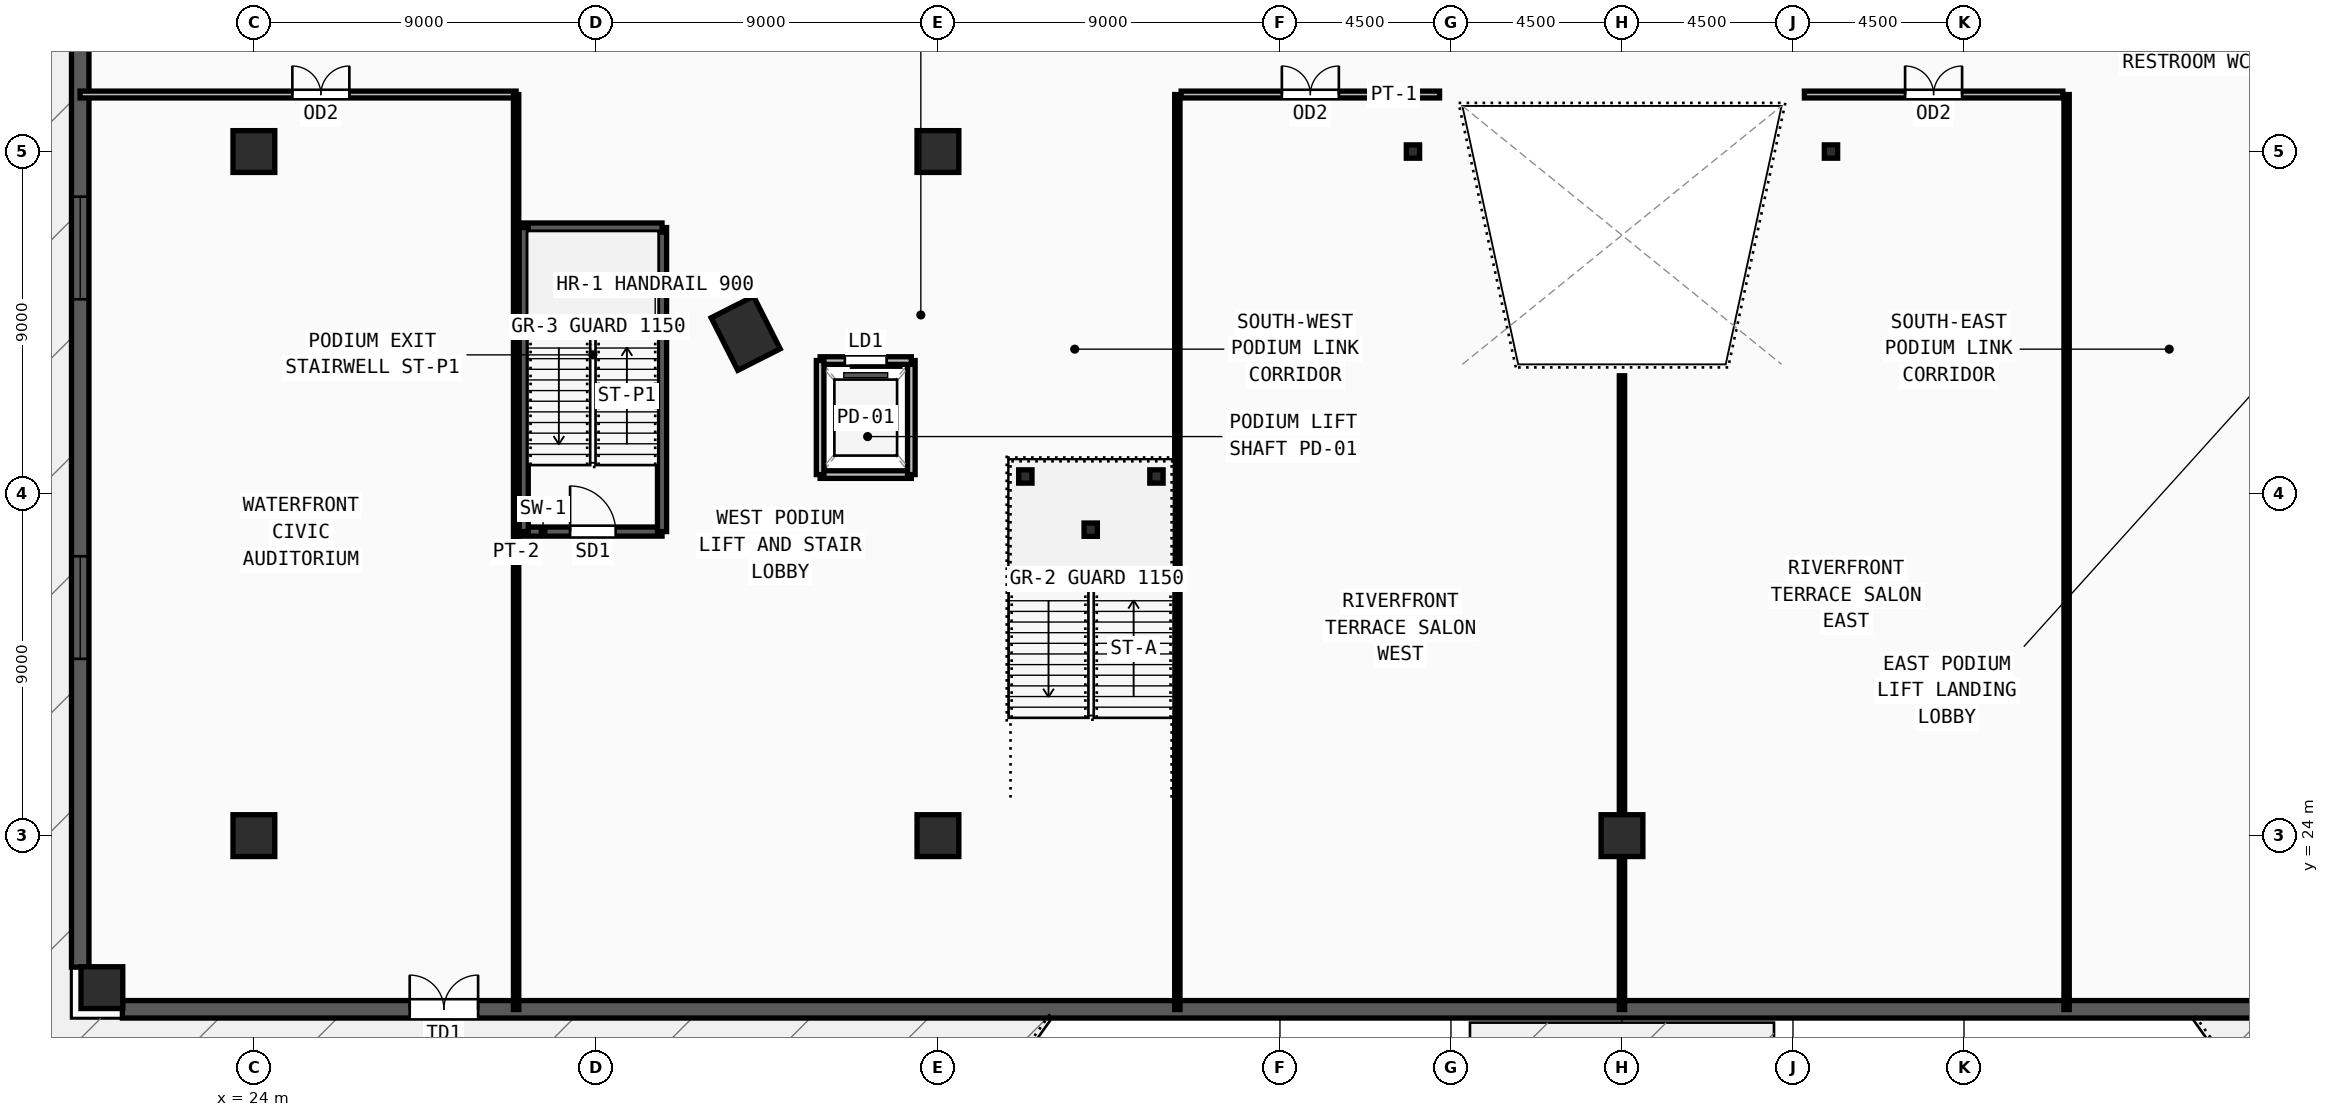
"""IFC4 building model, lengths in metres.
Left out: names, types, materials, properties, quantities, classifications, styles, units other than length and angle.
Written with IfcOpenShell. Run it as: python <this file> out.ifc"""

import sys

from ifc_helpers import new_model, si_unit, direction, frame, frame_2d, origin, origin_2d, place, context, subcontext, project, spatial, rectangle, i_section, extrude, source, transform, mapped, element, fill, save


model = new_model("IFC4")
c1 = context("Model", 3, precision=1e-05, world=origin(), true_north=direction((0.0, 1.0)))
c2 = subcontext(c1, "Body", "Model", "MODEL_VIEW")
j1 = project(units=[si_unit("LENGTHUNIT", "METRE"), si_unit("PLANEANGLEUNIT", "RADIAN")], contexts=[c1])
p1 = place(None, origin())
s1 = spatial("IfcSite", under=j1, at=p1, CompositionType="ELEMENT")
p2 = place(p1, origin())
s2 = spatial("IfcBuilding", under=s1, at=p2, CompositionType="ELEMENT")
p3 = place(p2, frame((0.0, 0.0, 9.9)))
s3 = spatial("IfcBuildingStorey", under=s2, at=p3, CompositionType="ELEMENT", Elevation=9.9)
m1 = source(origin(), c2, "Body", "SweptSolid", [
    extrude(rectangle(XDim=1.55, YDim=1.25, at=origin_2d()), origin(), (0.0, 0.0, 1.0), 4.5),
])
p4 = place(p3, frame((36.941, 37.217, 0.0), z_axis=(0.0, 0.0, 1.0), x_axis=(-0.451500573218, 0.892270829056, 0.0)))
e1 = element("IfcColumn", 1, at=p4, inside=s3, PredefinedType="COLUMN", context=c2, shape_type="MappedRepresentation", body=[
    mapped(m1, transform((0.0, 0.0, 0.0), x_axis=(1.0, 0.0, 0.0), y_axis=(0.0, 1.0, 0.0), z_axis=(0.0, 0.0, 1.0), scale=1.0)),
])
m2 = source(origin(), c2, "Body", "SweptSolid", [
    extrude(rectangle(XDim=1.1, YDim=1.1, at=origin_2d()), origin(), (0.0, 0.0, 1.0), 4.5),
])
for number, where, z_axis, x_axis in (
    (2, (24.0, 24.0, 0.0), (0.0, 0.0, 1.0), (1.0, 0.0, 0.0)),
    (3, (42.0, 24.0, 0.0), (0.0, 0.0, 1.0), (1.0, 0.0, 0.0)),
    (4, (60.0, 24.0, 0.0), (0.0, 0.0, 1.0), (1.0, 0.0, 0.0)),
    (5, (24.0, 42.0, 0.0), (0.0, 0.0, 1.0), (1.0, 0.0, 0.0)),
    (6, (42.0, 42.0, 0.0), (0.0, 0.0, 1.0), (1.0, 0.0, 0.0)),
    (7, (20.0, 20.0, 0.0), (0.0, 0.0, 1.0), (1.0, 0.0, 0.0)),
):
    element("IfcColumn", number, at=place(p3, frame(where, z_axis=z_axis, x_axis=x_axis)), inside=s3, PredefinedType="COLUMN", context=c2, shape_type="MappedRepresentation", body=[
        mapped(m2, transform((0.0, 0.0, 0.0), x_axis=(1.0, 0.0, 0.0), y_axis=(0.0, 1.0, 0.0), z_axis=(0.0, 0.0, 1.0), scale=1.0)),
    ])
m3 = source(origin(), c2, "Body", "SweptSolid", [
    extrude(i_section(OverallWidth=0.35, OverallDepth=0.35, WebThickness=0.012, FlangeThickness=0.019, at=origin_2d()), origin(), (0.0, 0.0, 1.0), 4.5),
])
for number, where, z_axis, x_axis in (
    (8, (54.5, 42.0, 0.0), (0.0, 0.0, 1.0), (1.0, 0.0, 0.0)),
    (9, (65.5, 42.0, 0.0), (0.0, 0.0, 1.0), (1.0, 0.0, 0.0)),
    (10, (44.3, 33.45, 0.0), (0.0, 0.0, 1.0), (1.0, 0.0, 0.0)),
    (11, (47.75, 33.45, 0.0), (0.0, 0.0, 1.0), (1.0, 0.0, 0.0)),
    (12, (46.02, 32.05, 0.0), (0.0, 0.0, 1.0), (1.0, 0.0, 0.0)),
):
    element("IfcColumn", number, at=place(p3, frame(where, z_axis=z_axis, x_axis=x_axis)), inside=s3, PredefinedType="COLUMN", context=c2, shape_type="MappedRepresentation", body=[
        mapped(m3, transform((0.0, 0.0, 0.0), x_axis=(1.0, 0.0, 0.0), y_axis=(0.0, 1.0, 0.0), z_axis=(0.0, 0.0, 1.0), scale=1.0)),
    ])
p5 = place(p3, frame((19.43, 86.77, 0.0), z_axis=(0.0, 0.0, 1.0), x_axis=(0.0, -1.0, 0.0)))
e13 = element("IfcWall", 13, at=p5, inside=s3, PredefinedType="SOLIDWALL", context=c2, shape_type="SweptSolid", body=[
    extrude(rectangle(XDim=66.23, YDim=0.46, at=frame_2d((33.115, 0.0))), origin(), (0.0, 0.0, 1.0), 4.25),
])
m4 = source(origin(), c2, "Body", "SweptSolid", [
    extrude(rectangle(XDim=2.7, YDim=2.35, at=frame_2d((1.35, 1.175))), frame((0.0, 0.24, 0.0), z_axis=(0.0, -1.0, 0.0), x_axis=(1.0, 0.0, 0.0)), (0.0, 0.0, 1.0), 0.48),
])
p6 = place(p5, frame((8.111, 0.0, 0.55)))
e14 = element("IfcOpeningElement", 14, at=p6, cuts=e13, PredefinedType="OPENING", context=c2, shape_type="MappedRepresentation", body=[
    mapped(m4, transform((0.0, 0.0, 0.0), x_axis=(1.0, 0.0, 0.0), y_axis=(0.0, 1.0, 0.0), z_axis=(0.0, 0.0, 1.0), scale=1.0)),
])
p7 = place(p5, frame((27.034, 0.0, 0.55)))
e15 = element("IfcOpeningElement", 15, at=p7, cuts=e13, PredefinedType="OPENING", context=c2, shape_type="MappedRepresentation", body=[
    mapped(m4, transform((0.0, 0.0, 0.0), x_axis=(1.0, 0.0, 0.0), y_axis=(0.0, 1.0, 0.0), z_axis=(0.0, 0.0, 1.0), scale=1.0)),
])
p8 = place(p5, frame((36.496, 0.0, 0.55)))
e16 = element("IfcOpeningElement", 16, at=p8, cuts=e13, PredefinedType="OPENING", context=c2, shape_type="MappedRepresentation", body=[
    mapped(m4, transform((0.0, 0.0, 0.0), x_axis=(1.0, 0.0, 0.0), y_axis=(0.0, 1.0, 0.0), z_axis=(0.0, 0.0, 1.0), scale=1.0)),
])
p9 = place(p5, frame((45.957, 0.0, 0.55)))
e17 = element("IfcOpeningElement", 17, at=p9, cuts=e13, PredefinedType="OPENING", context=c2, shape_type="MappedRepresentation", body=[
    mapped(m4, transform((0.0, 0.0, 0.0), x_axis=(1.0, 0.0, 0.0), y_axis=(0.0, 1.0, 0.0), z_axis=(0.0, 0.0, 1.0), scale=1.0)),
])
p10 = place(p5, frame((55.419, 0.0, 0.55)))
e18 = element("IfcOpeningElement", 18, at=p10, cuts=e13, PredefinedType="OPENING", context=c2, shape_type="MappedRepresentation", body=[
    mapped(m4, transform((0.0, 0.0, 0.0), x_axis=(1.0, 0.0, 0.0), y_axis=(0.0, 1.0, 0.0), z_axis=(0.0, 0.0, 1.0), scale=1.0)),
])
p11 = place(p3, frame((20.54, 19.43, 0.0), z_axis=(0.0, 0.0, 1.0), x_axis=(1.0, 0.0, 0.0)))
e19 = element("IfcWall", 19, at=p11, inside=s3, PredefinedType="SOLIDWALL", context=c2, shape_type="SweptSolid", body=[
    extrude(rectangle(XDim=78.92, YDim=0.46, at=frame_2d((39.46, 0.0))), origin(), (0.0, 0.0, 1.0), 4.25),
])
m5 = source(origin(), c2, "Body", "SweptSolid", [
    extrude(rectangle(XDim=1.8, YDim=2.3, at=frame_2d((0.9, 1.15))), frame((0.0, 0.24, 0.0), z_axis=(0.0, -1.0, 0.0), x_axis=(1.0, 0.0, 0.0)), (0.0, 0.0, 1.0), 0.48),
])
p12 = place(p11, frame((7.56, 0.0, 0.0)))
e20 = element("IfcOpeningElement", 20, at=p12, cuts=e19, PredefinedType="OPENING", context=c2, shape_type="MappedRepresentation", body=[
    mapped(m5, transform((0.0, 0.0, 0.0), x_axis=(1.0, 0.0, 0.0), y_axis=(0.0, 1.0, 0.0), z_axis=(0.0, 0.0, 1.0), scale=1.0)),
])
p13 = place(p11, frame((69.56, 0.0, 0.0)))
e21 = element("IfcOpeningElement", 21, at=p13, cuts=e19, PredefinedType="OPENING", context=c2, shape_type="MappedRepresentation", body=[
    mapped(m5, transform((0.0, 0.0, 0.0), x_axis=(1.0, 0.0, 0.0), y_axis=(0.0, 1.0, 0.0), z_axis=(0.0, 0.0, 1.0), scale=1.0)),
])
p14 = place(p3, frame((31.1, 32.0, 0.0), z_axis=(0.0, 0.0, 1.0), x_axis=(1.0, 0.0, 0.0)))
e22 = element("IfcWall", 22, at=p14, inside=s3, PredefinedType="SOLIDWALL", context=c2, shape_type="SweptSolid", body=[
    extrude(rectangle(XDim=3.64, YDim=0.24, at=frame_2d((1.82, 0.0))), origin(), (0.0, 0.0, 1.0), 4.25),
])
m6 = source(origin(), c2, "Body", "SweptSolid", [
    extrude(rectangle(XDim=1.2, YDim=2.2, at=frame_2d((0.6, 1.1))), frame((0.0, 0.13, 0.0), z_axis=(0.0, -1.0, 0.0), x_axis=(1.0, 0.0, 0.0)), (0.0, 0.0, 1.0), 0.26),
])
p15 = place(p14, frame((1.22, 0.0, 0.0)))
e23 = element("IfcOpeningElement", 23, at=p15, cuts=e22, PredefinedType="OPENING", context=c2, shape_type="MappedRepresentation", body=[
    mapped(m6, transform((0.0, 0.0, 0.0), x_axis=(1.0, 0.0, 0.0), y_axis=(0.0, 1.0, 0.0), z_axis=(0.0, 0.0, 1.0), scale=1.0)),
])
p16 = place(p3, frame((34.74, 32.0, 0.0), z_axis=(0.0, 0.0, 1.0), x_axis=(0.0, 1.0, 0.0)))
e24 = element("IfcWall", 24, at=p16, inside=s3, PredefinedType="SOLIDWALL", context=c2, shape_type="SweptSolid", body=[
    extrude(rectangle(XDim=8.0, YDim=0.24, at=frame_2d((4.0, 0.0))), origin(), (0.0, 0.0, 1.0), 4.25),
])
p17 = place(p3, frame((34.74, 40.0, 0.0), z_axis=(0.0, 0.0, 1.0), x_axis=(-1.0, 0.0, 0.0)))
e25 = element("IfcWall", 25, at=p17, inside=s3, PredefinedType="SOLIDWALL", context=c2, shape_type="SweptSolid", body=[
    extrude(rectangle(XDim=3.64, YDim=0.24, at=frame_2d((1.82, 0.0))), origin(), (0.0, 0.0, 1.0), 4.25),
])
p18 = place(p3, frame((31.1, 40.0, 0.0), z_axis=(0.0, 0.0, 1.0), x_axis=(0.0, -1.0, 0.0)))
e26 = element("IfcWall", 26, at=p18, inside=s3, PredefinedType="SOLIDWALL", context=c2, shape_type="SweptSolid", body=[
    extrude(rectangle(XDim=8.0, YDim=0.24, at=frame_2d((4.0, 0.0))), origin(), (0.0, 0.0, 1.0), 4.25),
])
p19 = place(p3, frame((38.9, 33.5, 0.0), z_axis=(0.0, 0.0, 1.0), x_axis=(1.0, 0.0, 0.0)))
e27 = element("IfcWall", 27, at=p19, inside=s3, PredefinedType="SOLIDWALL", context=c2, shape_type="SweptSolid", body=[
    extrude(rectangle(XDim=2.4, YDim=0.2, at=frame_2d((1.2, 0.0))), origin(), (0.0, 0.0, 1.0), 4.25),
])
p20 = place(p3, frame((41.3, 33.5, 0.0), z_axis=(0.0, 0.0, 1.0), x_axis=(0.0, 1.0, 0.0)))
e28 = element("IfcWall", 28, at=p20, inside=s3, PredefinedType="SOLIDWALL", context=c2, shape_type="SweptSolid", body=[
    extrude(rectangle(XDim=3.0, YDim=0.2, at=frame_2d((1.5, 0.0))), origin(), (0.0, 0.0, 1.0), 4.25),
])
p21 = place(p3, frame((41.3, 36.5, 0.0), z_axis=(0.0, 0.0, 1.0), x_axis=(-1.0, 0.0, 0.0)))
e29 = element("IfcWall", 29, at=p21, inside=s3, PredefinedType="SOLIDWALL", context=c2, shape_type="SweptSolid", body=[
    extrude(rectangle(XDim=2.4, YDim=0.2, at=frame_2d((1.2, 0.0))), origin(), (0.0, 0.0, 1.0), 4.25),
])
m7 = source(origin(), c2, "Body", "SweptSolid", [
    extrude(rectangle(XDim=1.1, YDim=2.2, at=frame_2d((0.55, 1.1))), frame((0.0, 0.11, 0.0), z_axis=(0.0, -1.0, 0.0), x_axis=(1.0, 0.0, 0.0)), (0.0, 0.0, 1.0), 0.22),
])
p22 = place(p21, frame((0.65, 0.0, 0.0)))
e30 = element("IfcOpeningElement", 30, at=p22, cuts=e29, PredefinedType="OPENING", context=c2, shape_type="MappedRepresentation", body=[
    mapped(m7, transform((0.0, 0.0, 0.0), x_axis=(1.0, 0.0, 0.0), y_axis=(0.0, 1.0, 0.0), z_axis=(0.0, 0.0, 1.0), scale=1.0)),
])
p23 = place(p3, frame((38.9, 36.5, 0.0), z_axis=(0.0, 0.0, 1.0), x_axis=(0.0, -1.0, 0.0)))
e31 = element("IfcWall", 31, at=p23, inside=s3, PredefinedType="SOLIDWALL", context=c2, shape_type="SweptSolid", body=[
    extrude(rectangle(XDim=3.0, YDim=0.2, at=frame_2d((1.5, 0.0))), origin(), (0.0, 0.0, 1.0), 4.25),
])
p24 = place(p3, frame((48.4, 43.5, 0.0), z_axis=(0.0, 0.0, 1.0), x_axis=(1.0, 0.0, 0.0)))
e32 = element("IfcWall", 32, at=p24, inside=s3, PredefinedType="PARTITIONING", context=c2, shape_type="SweptSolid", body=[
    extrude(rectangle(XDim=6.8, YDim=0.18, at=frame_2d((3.4, 0.0))), origin(), (0.0, 0.0, 1.0), 4.25),
])
m8 = source(origin(), c2, "Body", "SweptSolid", [
    extrude(rectangle(XDim=1.5, YDim=2.2, at=frame_2d((0.75, 1.1))), frame((0.0, 0.1, 0.0), z_axis=(0.0, -1.0, 0.0), x_axis=(1.0, 0.0, 0.0)), (0.0, 0.0, 1.0), 0.2),
])
p25 = place(p24, frame((2.65, 0.0, 0.0)))
e33 = element("IfcOpeningElement", 33, at=p25, cuts=e32, PredefinedType="OPENING", context=c2, shape_type="MappedRepresentation", body=[
    mapped(m8, transform((0.0, 0.0, 0.0), x_axis=(1.0, 0.0, 0.0), y_axis=(0.0, 1.0, 0.0), z_axis=(0.0, 0.0, 1.0), scale=1.0)),
])
p26 = place(p3, frame((64.8, 43.5, 0.0), z_axis=(0.0, 0.0, 1.0), x_axis=(1.0, 0.0, 0.0)))
e34 = element("IfcWall", 34, at=p26, inside=s3, PredefinedType="PARTITIONING", context=c2, shape_type="SweptSolid", body=[
    extrude(rectangle(XDim=6.8, YDim=0.18, at=frame_2d((3.4, 0.0))), origin(), (0.0, 0.0, 1.0), 4.25),
])
p27 = place(p26, frame((2.65, 0.0, 0.0)))
e35 = element("IfcOpeningElement", 35, at=p27, cuts=e34, PredefinedType="OPENING", context=c2, shape_type="MappedRepresentation", body=[
    mapped(m8, transform((0.0, 0.0, 0.0), x_axis=(1.0, 0.0, 0.0), y_axis=(0.0, 1.0, 0.0), z_axis=(0.0, 0.0, 1.0), scale=1.0)),
])
p28 = place(p3, frame((19.425, 43.5, 0.0), z_axis=(0.0, 0.0, 1.0), x_axis=(1.0, 0.0, 0.0)))
e36 = element("IfcWall", 36, at=p28, inside=s3, PredefinedType="PARTITIONING", context=c2, shape_type="SweptSolid", body=[
    extrude(rectangle(XDim=11.475, YDim=0.18, at=frame_2d((5.737, 0.0))), origin(), (0.0, 0.0, 1.0), 4.25),
])
p29 = place(p28, frame((5.587, 0.0, 0.0)))
e37 = element("IfcOpeningElement", 37, at=p29, cuts=e36, PredefinedType="OPENING", context=c2, shape_type="MappedRepresentation", body=[
    mapped(m8, transform((0.0, 0.0, 0.0), x_axis=(1.0, 0.0, 0.0), y_axis=(0.0, 1.0, 0.0), z_axis=(0.0, 0.0, 1.0), scale=1.0)),
])
for number, where, z_axis, x_axis in (
    (38, (30.9, 19.425, 0.0), (0.0, 0.0, 1.0), (0.0, 1.0, 0.0)),
    (39, (48.3, 19.425, 0.0), (0.0, 0.0, 1.0), (0.0, 1.0, 0.0)),
    (40, (71.7, 19.425, 0.0), (0.0, 0.0, 1.0), (0.0, 1.0, 0.0)),
):
    element("IfcWall", number, at=place(p3, frame(where, z_axis=z_axis, x_axis=x_axis)), inside=s3, PredefinedType="PARTITIONING", context=c2, shape_type="SweptSolid", body=[
        extrude(rectangle(XDim=24.075, YDim=0.14, at=frame_2d((12.038, 0.0))), origin(), (0.0, 0.0, 1.0), 4.25),
    ])
p30 = place(p3, frame((60.0, 19.425, 0.0), z_axis=(0.0, 0.0, 1.0), x_axis=(0.0, 1.0, 0.0)))
e41 = element("IfcWall", 41, at=p30, inside=s3, PredefinedType="PARTITIONING", context=c2, shape_type="SweptSolid", body=[
    extrude(rectangle(XDim=16.675, YDim=0.14, at=frame_2d((8.337, 0.0))), origin(), (0.0, 0.0, 1.0), 4.25),
])
m9 = source(origin(), c2, "Body", "SweptSolid", [
    extrude(rectangle(XDim=2.7, YDim=2.35, at=frame_2d((1.35, 1.175))), frame((0.0, 0.03, 0.0), z_axis=(0.0, -1.0, 0.0), x_axis=(1.0, 0.0, 0.0)), (0.0, 0.0, 1.0), 0.06),
])
p31 = place(p9, origin())
e42 = element("IfcWindow", 42, at=p31, inside=s3, PartitioningType="TRIPLE_PANEL_VERTICAL", PredefinedType="WINDOW", context=c2, shape_type="MappedRepresentation", body=[
    mapped(m9, transform((0.0, 0.0, 0.0), x_axis=(1.0, 0.0, 0.0), y_axis=(0.0, 1.0, 0.0), z_axis=(0.0, 0.0, 1.0), scale=1.0)),
])
fill(e17, e42)
p32 = place(p10, origin())
e43 = element("IfcWindow", 43, at=p32, inside=s3, PartitioningType="TRIPLE_PANEL_VERTICAL", PredefinedType="WINDOW", context=c2, shape_type="MappedRepresentation", body=[
    mapped(m9, transform((0.0, 0.0, 0.0), x_axis=(1.0, 0.0, 0.0), y_axis=(0.0, 1.0, 0.0), z_axis=(0.0, 0.0, 1.0), scale=1.0)),
])
fill(e18, e43)
m10 = source(origin(), c2, "Body", "SweptSolid", [
    extrude(rectangle(XDim=1.8, YDim=2.3, at=frame_2d((0.9, 1.15))), frame((0.0, 0.025, 0.0), z_axis=(0.0, -1.0, 0.0), x_axis=(1.0, 0.0, 0.0)), (0.0, 0.0, 1.0), 0.05),
])
p33 = place(p12, origin())
e44 = element("IfcDoor", 44, at=p33, inside=s3, OperationType="DOUBLE_DOOR_SINGLE_SWING", PredefinedType="DOOR", context=c2, shape_type="MappedRepresentation", body=[
    mapped(m10, transform((0.0, 0.0, 0.0), x_axis=(1.0, 0.0, 0.0), y_axis=(0.0, 1.0, 0.0), z_axis=(0.0, 0.0, 1.0), scale=1.0)),
])
fill(e20, e44)
m11 = source(origin(), c2, "Body", "SweptSolid", [
    extrude(rectangle(XDim=1.2, YDim=2.2, at=frame_2d((0.6, 1.1))), frame((0.0, 0.025, 0.0), z_axis=(0.0, -1.0, 0.0), x_axis=(1.0, 0.0, 0.0)), (0.0, 0.0, 1.0), 0.05),
])
p34 = place(p15, origin())
e45 = element("IfcDoor", 45, at=p34, inside=s3, OperationType="SINGLE_SWING_LEFT", PredefinedType="DOOR", context=c2, shape_type="MappedRepresentation", body=[
    mapped(m11, transform((0.0, 0.0, 0.0), x_axis=(1.0, 0.0, 0.0), y_axis=(0.0, 1.0, 0.0), z_axis=(0.0, 0.0, 1.0), scale=1.0)),
])
fill(e23, e45)
m12 = source(origin(), c2, "Body", "SweptSolid", [
    extrude(rectangle(XDim=1.1, YDim=2.2, at=frame_2d((0.55, 1.1))), frame((0.0, 0.025, 0.0), z_axis=(0.0, -1.0, 0.0), x_axis=(1.0, 0.0, 0.0)), (0.0, 0.0, 1.0), 0.05),
])
p35 = place(p22, origin())
e46 = element("IfcDoor", 46, at=p35, inside=s3, OperationType="SLIDING_TO_LEFT", PredefinedType="DOOR", context=c2, shape_type="MappedRepresentation", body=[
    mapped(m12, transform((0.0, 0.0, 0.0), x_axis=(1.0, 0.0, 0.0), y_axis=(0.0, 1.0, 0.0), z_axis=(0.0, 0.0, 1.0), scale=1.0)),
])
fill(e30, e46)
m13 = source(origin(), c2, "Body", "SweptSolid", [
    extrude(rectangle(XDim=1.5, YDim=2.2, at=frame_2d((0.75, 1.1))), frame((0.0, 0.025, 0.0), z_axis=(0.0, -1.0, 0.0), x_axis=(1.0, 0.0, 0.0)), (0.0, 0.0, 1.0), 0.05),
])
p36 = place(p25, origin())
e47 = element("IfcDoor", 47, at=p36, inside=s3, OperationType="DOUBLE_DOOR_SINGLE_SWING", PredefinedType="DOOR", context=c2, shape_type="MappedRepresentation", body=[
    mapped(m13, transform((0.0, 0.0, 0.0), x_axis=(1.0, 0.0, 0.0), y_axis=(0.0, 1.0, 0.0), z_axis=(0.0, 0.0, 1.0), scale=1.0)),
])
fill(e33, e47)
p37 = place(p27, origin())
e48 = element("IfcDoor", 48, at=p37, inside=s3, OperationType="DOUBLE_DOOR_SINGLE_SWING", PredefinedType="DOOR", context=c2, shape_type="MappedRepresentation", body=[
    mapped(m13, transform((0.0, 0.0, 0.0), x_axis=(1.0, 0.0, 0.0), y_axis=(0.0, 1.0, 0.0), z_axis=(0.0, 0.0, 1.0), scale=1.0)),
])
fill(e35, e48)
p38 = place(p29, origin())
e49 = element("IfcDoor", 49, at=p38, inside=s3, OperationType="DOUBLE_DOOR_SINGLE_SWING", PredefinedType="DOOR", context=c2, shape_type="MappedRepresentation", body=[
    mapped(m13, transform((0.0, 0.0, 0.0), x_axis=(1.0, 0.0, 0.0), y_axis=(0.0, 1.0, 0.0), z_axis=(0.0, 0.0, 1.0), scale=1.0)),
])
fill(e37, e49)
save(model, sys.argv[1])
